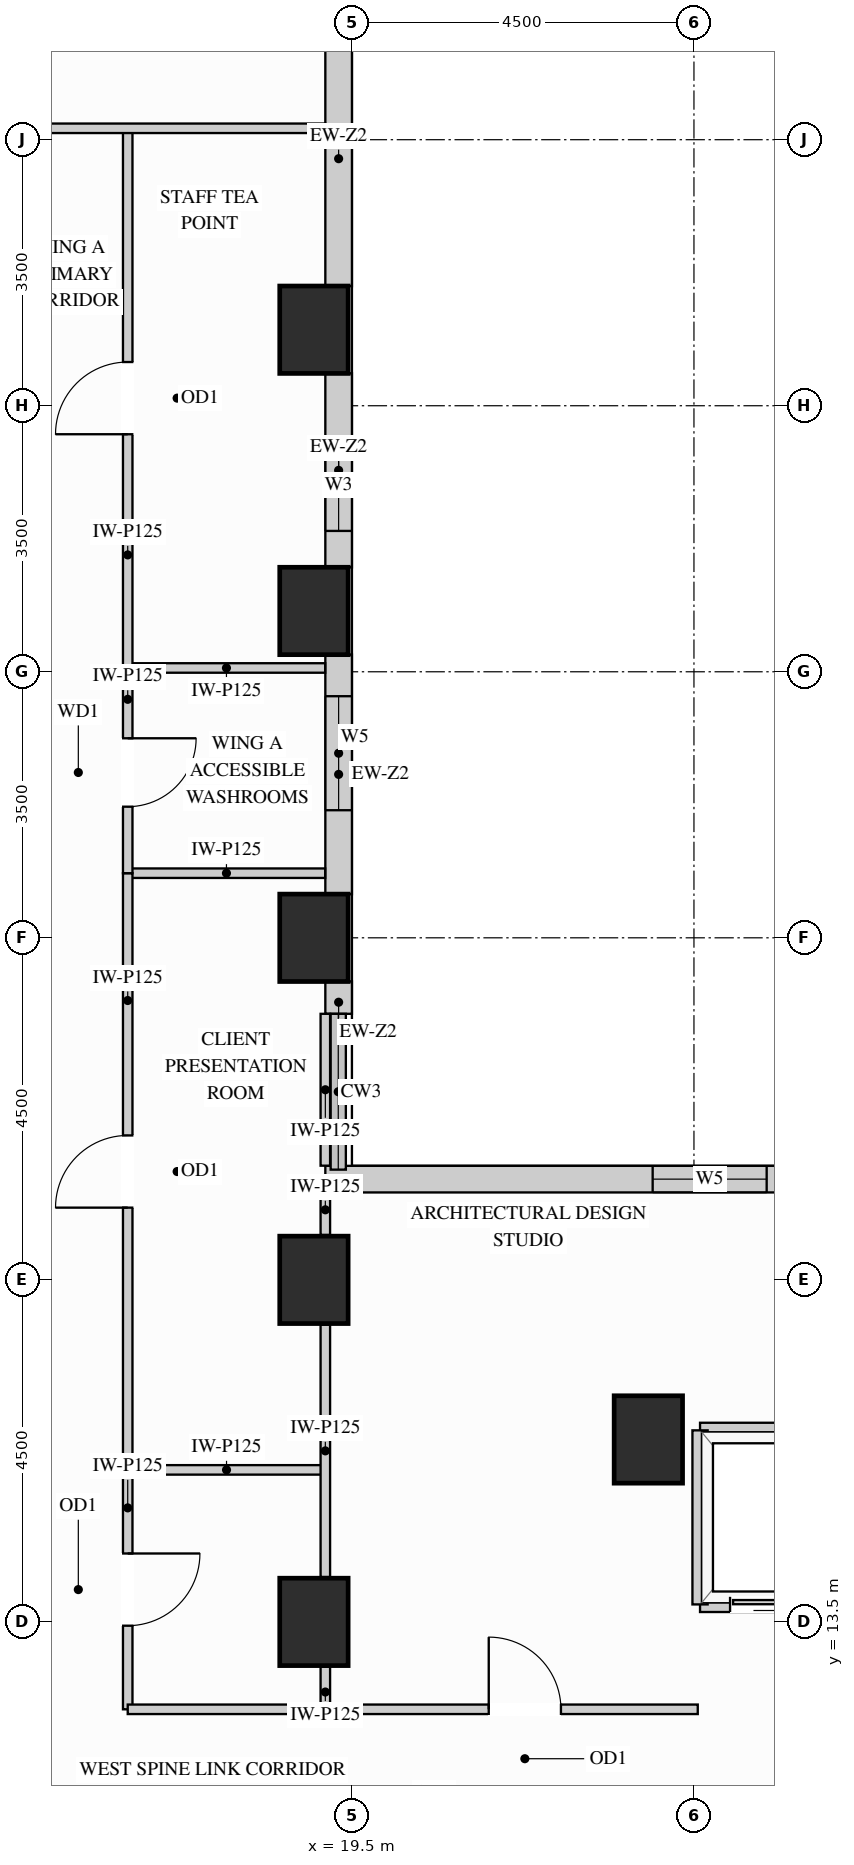
"""IFC4 building model, lengths in metres.
Left out: names, types, materials, properties, quantities, classifications, styles, units other than length and angle.
Written with IfcOpenShell. Run it as: python <this file> out.ifc"""

import sys

from ifc_helpers import new_model, si_unit, direction, frame, frame_2d, origin, origin_2d, place, context, subcontext, project, spatial, rectangle, extrude, source, transform, mapped, element, fill, save


model = new_model("IFC4")
c1 = context("Model", 3, precision=1e-05, world=origin(), true_north=direction((0.0, 1.0)))
c2 = subcontext(c1, "Body", "Model", "MODEL_VIEW")
j1 = project(units=[si_unit("LENGTHUNIT", "METRE"), si_unit("PLANEANGLEUNIT", "RADIAN")], contexts=[c1])
p1 = place(None, origin())
s1 = spatial("IfcSite", under=j1, at=p1, CompositionType="ELEMENT")
p2 = place(p1, origin())
s2 = spatial("IfcBuilding", under=s1, at=p2, CompositionType="ELEMENT")
p3 = place(p2, frame((0.0, 0.0, 109.8)))
s3 = spatial("IfcBuildingStorey", under=s2, at=p3, CompositionType="ELEMENT", Elevation=109.8)
m1 = source(origin(), c2, "Body", "SweptSolid", [
    extrude(rectangle(XDim=0.9, YDim=1.15, at=origin_2d()), origin(), (0.0, 0.0, 1.0), 3.38),
])
for number, where, z_axis, x_axis in (
    (1, (19.0, 13.5, 0.0), (0.0, 0.0, 1.0), (1.0, 0.0, 0.0)),
    (2, (19.0, 18.0, 0.0), (0.0, 0.0, 1.0), (1.0, 0.0, 0.0)),
    (3, (19.0, 22.5, 0.0), (0.0, 0.0, 1.0), (1.0, 0.0, 0.0)),
    (4, (19.0, 26.8, 0.0), (0.0, 0.0, 1.0), (1.0, 0.0, 0.0)),
    (5, (19.0, 30.5, 0.0), (0.0, 0.0, 1.0), (1.0, 0.0, 0.0)),
    (6, (23.4, 15.9, 0.0), (0.0, 0.0, 1.0), (1.0, 0.0, 0.0)),
):
    element("IfcColumn", number, at=place(p3, frame(where, z_axis=z_axis, x_axis=x_axis)), inside=s3, PredefinedType="COLUMN", context=c2, shape_type="MappedRepresentation", body=[
        mapped(m1, transform((0.0, 0.0, 0.0), x_axis=(1.0, 0.0, 0.0), y_axis=(0.0, 1.0, 0.0), z_axis=(0.0, 0.0, 1.0))),
    ])
m2 = source(origin(), c2, "Body", "SweptSolid", [
    extrude(rectangle(XDim=0.427, YDim=0.35, at=frame_2d((0.213, 0.0))), origin(), (0.0, 0.0, 1.0), 2.519),
])
p4 = place(p3, frame((19.325, 21.5, 0.0), z_axis=(0.0, 0.0, 1.0), x_axis=(0.0, 1.0, 0.0)))
e7 = element("IfcWall", 7, at=p4, inside=s3, PredefinedType="SOLIDWALL", context=c2, shape_type="MappedRepresentation", body=[
    mapped(m2, transform((0.0, 0.0, 0.0), x_axis=(1.0, 0.0, 0.0), y_axis=(0.0, 1.0, 0.0), z_axis=(0.0, 0.0, 1.0))),
])
p5 = place(p3, frame((19.325, 23.073, 0.0), z_axis=(0.0, 0.0, 1.0), x_axis=(0.0, 1.0, 0.0)))
e8 = element("IfcWall", 8, at=p5, inside=s3, PredefinedType="SOLIDWALL", context=c2, shape_type="SweptSolid", body=[
    extrude(rectangle(XDim=3.154, YDim=0.35, at=frame_2d((1.577, 0.0))), origin(), (0.0, 0.0, 1.0), 2.519),
])
p6 = place(p5, frame((1.105, 0.0, 0.78)))
e9 = element("IfcOpeningElement", 9, at=p6, cuts=e8, PredefinedType="OPENING", context=c2, shape_type="SweptSolid", body=[
    extrude(rectangle(XDim=1.5, YDim=1.559, at=frame_2d((0.75, 0.78))), frame((0.0, 0.185, 0.0), z_axis=(0.0, -1.0, 0.0), x_axis=(1.0, 0.0, 0.0)), (0.0, 0.0, 1.0), 0.37),
])
p7 = place(p3, frame((19.325, 27.373, 0.0), z_axis=(0.0, 0.0, 1.0), x_axis=(0.0, 1.0, 0.0)))
e10 = element("IfcWall", 10, at=p7, inside=s3, PredefinedType="SOLIDWALL", context=c2, shape_type="SweptSolid", body=[
    extrude(rectangle(XDim=2.554, YDim=0.35, at=frame_2d((1.277, 0.0))), origin(), (0.0, 0.0, 1.0), 2.519),
])
p8 = place(p7, frame((0.48, 0.0, 0.78)))
e11 = element("IfcOpeningElement", 11, at=p8, cuts=e10, PredefinedType="OPENING", context=c2, shape_type="SweptSolid", body=[
    extrude(rectangle(XDim=1.2, YDim=1.559, at=frame_2d((0.6, 0.78))), frame((0.0, 0.185, 0.0), z_axis=(0.0, -1.0, 0.0), x_axis=(1.0, 0.0, 0.0)), (0.0, 0.0, 1.0), 0.37),
])
m3 = source(origin(), c2, "Body", "SweptSolid", [
    extrude(rectangle(XDim=3.354, YDim=0.35, at=frame_2d((1.677, 0.0))), origin(), (0.0, 0.0, 1.0), 2.519),
])
p9 = place(p3, frame((19.325, 31.073, 0.0), z_axis=(0.0, 0.0, 1.0), x_axis=(0.0, 1.0, 0.0)))
e12 = element("IfcWall", 12, at=p9, inside=s3, PredefinedType="SOLIDWALL", context=c2, shape_type="MappedRepresentation", body=[
    mapped(m3, transform((0.0, 0.0, 0.0), x_axis=(1.0, 0.0, 0.0), y_axis=(0.0, 1.0, 0.0), z_axis=(0.0, 0.0, 1.0))),
])
p10 = place(p3, frame((34.75, 19.325, 0.0), z_axis=(0.0, 0.0, 1.0), x_axis=(-1.0, 0.0, 0.0)))
e13 = element("IfcWall", 13, at=p10, inside=s3, PredefinedType="SOLIDWALL", context=c2, shape_type="SweptSolid", body=[
    extrude(rectangle(XDim=15.6, YDim=0.35, at=frame_2d((7.8, 0.0))), origin(), (0.0, 0.0, 1.0), 3.365),
])
p11 = place(p10, frame((4.307, 0.0, 0.78)))
e14 = element("IfcOpeningElement", 14, at=p11, cuts=e13, PredefinedType="OPENING", context=c2, shape_type="SweptSolid", body=[
    extrude(rectangle(XDim=1.5, YDim=2.0, at=frame_2d((0.75, 1.0))), frame((0.0, 0.185, 0.0), z_axis=(0.0, -1.0, 0.0), x_axis=(1.0, 0.0, 0.0)), (0.0, 0.0, 1.0), 0.37),
])
p12 = place(p10, frame((9.793, 0.0, 0.78)))
e15 = element("IfcOpeningElement", 15, at=p12, cuts=e13, PredefinedType="OPENING", context=c2, shape_type="SweptSolid", body=[
    extrude(rectangle(XDim=1.5, YDim=2.0, at=frame_2d((0.75, 1.0))), frame((0.0, 0.185, 0.0), z_axis=(0.0, -1.0, 0.0), x_axis=(1.0, 0.0, 0.0)), (0.0, 0.0, 1.0), 0.37),
])
m4 = source(origin(), c2, "Body", "SweptSolid", [
    extrude(rectangle(XDim=2.6, YDim=0.125, at=frame_2d((1.3, 0.0))), origin(), (0.0, 0.0, 1.0), 3.365),
])
p13 = place(p3, frame((16.55, 15.5, 0.0), z_axis=(0.0, 0.0, 1.0), x_axis=(1.0, 0.0, 0.0)))
e16 = element("IfcWall", 16, at=p13, inside=s3, PredefinedType="PARTITIONING", context=c2, shape_type="MappedRepresentation", body=[
    mapped(m4, transform((0.0, 0.0, 0.0), x_axis=(1.0, 0.0, 0.0), y_axis=(0.0, 1.0, 0.0), z_axis=(0.0, 0.0, 1.0))),
])
m5 = source(origin(), c2, "Body", "SweptSolid", [
    extrude(rectangle(XDim=2.598, YDim=0.125, at=frame_2d((1.299, 0.0))), origin(), (0.0, 0.0, 1.0), 3.365),
])
for number, where, z_axis, x_axis in (
    (17, (16.55, 23.35, 0.0), (0.0, 0.0, 1.0), (1.0, 0.0, 0.0)),
    (18, (16.55, 26.05, 0.0), (0.0, 0.0, 1.0), (1.0, 0.0, 0.0)),
):
    element("IfcWall", number, at=place(p3, frame(where, z_axis=z_axis, x_axis=x_axis)), inside=s3, PredefinedType="PARTITIONING", context=c2, shape_type="MappedRepresentation", body=[
        mapped(m5, transform((0.0, 0.0, 0.0), x_axis=(1.0, 0.0, 0.0), y_axis=(0.0, 1.0, 0.0), z_axis=(0.0, 0.0, 1.0))),
    ])
m6 = source(origin(), c2, "Body", "SweptSolid", [
    extrude(rectangle(XDim=0.56, YDim=0.125, at=frame_2d((0.28, 0.0))), origin(), (0.0, 0.0, 1.0), 2.677),
])
p14 = place(p3, frame((19.15, 12.35, 0.0), z_axis=(0.0, 0.0, 1.0), x_axis=(0.0, 1.0, 0.0)))
e19 = element("IfcWall", 19, at=p14, inside=s3, PredefinedType="PARTITIONING", context=c2, shape_type="MappedRepresentation", body=[
    mapped(m6, transform((0.0, 0.0, 0.0), x_axis=(1.0, 0.0, 0.0), y_axis=(0.0, 1.0, 0.0), z_axis=(0.0, 0.0, 1.0))),
])
m7 = source(origin(), c2, "Body", "SweptSolid", [
    extrude(rectangle(XDim=3.32, YDim=0.125, at=frame_2d((1.66, 0.0))), origin(), (0.0, 0.0, 1.0), 2.677),
])
p15 = place(p3, frame((19.15, 14.09, 0.0), z_axis=(0.0, 0.0, 1.0), x_axis=(0.0, 1.0, 0.0)))
e20 = element("IfcWall", 20, at=p15, inside=s3, PredefinedType="PARTITIONING", context=c2, shape_type="MappedRepresentation", body=[
    mapped(m7, transform((0.0, 0.0, 0.0), x_axis=(1.0, 0.0, 0.0), y_axis=(0.0, 1.0, 0.0), z_axis=(0.0, 0.0, 1.0))),
])
m8 = source(origin(), c2, "Body", "SweptSolid", [
    extrude(rectangle(XDim=0.558, YDim=0.125, at=frame_2d((0.279, 0.0))), origin(), (0.0, 0.0, 1.0), 2.519),
])
p16 = place(p3, frame((19.15, 18.59, 0.0), z_axis=(0.0, 0.0, 1.0), x_axis=(0.0, 1.0, 0.0)))
e21 = element("IfcWall", 21, at=p16, inside=s3, PredefinedType="PARTITIONING", context=c2, shape_type="MappedRepresentation", body=[
    mapped(m8, transform((0.0, 0.0, 0.0), x_axis=(1.0, 0.0, 0.0), y_axis=(0.0, 1.0, 0.0), z_axis=(0.0, 0.0, 1.0))),
])
m9 = source(origin(), c2, "Body", "SweptSolid", [
    extrude(rectangle(XDim=1.998, YDim=0.125, at=frame_2d((0.999, 0.0))), origin(), (0.0, 0.0, 1.0), 2.519),
])
p17 = place(p3, frame((19.15, 19.502, 0.0), z_axis=(0.0, 0.0, 1.0), x_axis=(0.0, 1.0, 0.0)))
e22 = element("IfcWall", 22, at=p17, inside=s3, PredefinedType="PARTITIONING", context=c2, shape_type="MappedRepresentation", body=[
    mapped(m9, transform((0.0, 0.0, 0.0), x_axis=(1.0, 0.0, 0.0), y_axis=(0.0, 1.0, 0.0), z_axis=(0.0, 0.0, 1.0))),
])
p18 = place(p3, frame((16.55, 12.35, 0.0), z_axis=(0.0, 0.0, 1.0), x_axis=(0.0, 1.0, 0.0)))
e23 = element("IfcWall", 23, at=p18, inside=s3, PredefinedType="PARTITIONING", context=c2, shape_type="SweptSolid", body=[
    extrude(rectangle(XDim=3.15, YDim=0.125, at=frame_2d((1.575, 0.0))), origin(), (0.0, 0.0, 1.0), 3.365),
])
p19 = place(p18, frame((1.1, 0.0, 0.0)))
e24 = element("IfcOpeningElement", 24, at=p19, cuts=e23, PredefinedType="OPENING", context=c2, shape_type="SweptSolid", body=[
    extrude(rectangle(XDim=0.95, YDim=2.15, at=frame_2d((0.475, 1.075))), frame((0.0, 0.073, 0.0), z_axis=(0.0, -1.0, 0.0), x_axis=(1.0, 0.0, 0.0)), (0.0, 0.0, 1.0), 0.145),
])
p20 = place(p3, frame((16.55, 15.5, 0.0), z_axis=(0.0, 0.0, 1.0), x_axis=(0.0, 1.0, 0.0)))
e25 = element("IfcWall", 25, at=p20, inside=s3, PredefinedType="PARTITIONING", context=c2, shape_type="SweptSolid", body=[
    extrude(rectangle(XDim=7.85, YDim=0.125, at=frame_2d((3.925, 0.0))), origin(), (0.0, 0.0, 1.0), 3.365),
])
p21 = place(p20, frame((3.45, 0.0, 0.0)))
e26 = element("IfcOpeningElement", 26, at=p21, cuts=e25, PredefinedType="OPENING", context=c2, shape_type="SweptSolid", body=[
    extrude(rectangle(XDim=0.95, YDim=2.15, at=frame_2d((0.475, 1.075))), frame((0.0, 0.073, 0.0), z_axis=(0.0, -1.0, 0.0), x_axis=(1.0, 0.0, 0.0)), (0.0, 0.0, 1.0), 0.145),
])
p22 = place(p3, frame((16.55, 26.05, 0.0), z_axis=(0.0, 0.0, 1.0), x_axis=(0.0, 1.0, 0.0)))
e27 = element("IfcWall", 27, at=p22, inside=s3, PredefinedType="PARTITIONING", context=c2, shape_type="SweptSolid", body=[
    extrude(rectangle(XDim=7.1, YDim=0.125, at=frame_2d((3.55, 0.0))), origin(), (0.0, 0.0, 1.0), 3.365),
])
p23 = place(p22, frame((3.075, 0.0, 0.0)))
e28 = element("IfcOpeningElement", 28, at=p23, cuts=e27, PredefinedType="OPENING", context=c2, shape_type="SweptSolid", body=[
    extrude(rectangle(XDim=0.95, YDim=2.15, at=frame_2d((0.475, 1.075))), frame((0.0, 0.073, 0.0), z_axis=(0.0, -1.0, 0.0), x_axis=(1.0, 0.0, 0.0)), (0.0, 0.0, 1.0), 0.145),
])
p24 = place(p3, frame((16.55, 23.35, 0.0), z_axis=(0.0, 0.0, 1.0), x_axis=(0.0, 1.0, 0.0)))
e29 = element("IfcWall", 29, at=p24, inside=s3, PredefinedType="PARTITIONING", context=c2, shape_type="SweptSolid", body=[
    extrude(rectangle(XDim=2.7, YDim=0.125, at=frame_2d((1.35, 0.0))), origin(), (0.0, 0.0, 1.0), 3.365),
])
p25 = place(p24, frame((0.875, 0.0, 0.0)))
e30 = element("IfcOpeningElement", 30, at=p25, cuts=e29, PredefinedType="OPENING", context=c2, shape_type="SweptSolid", body=[
    extrude(rectangle(XDim=0.9, YDim=2.15, at=frame_2d((0.45, 1.075))), frame((0.0, 0.073, 0.0), z_axis=(0.0, -1.0, 0.0), x_axis=(1.0, 0.0, 0.0)), (0.0, 0.0, 1.0), 0.145),
])
m10 = source(origin(), c2, "Body", "SweptSolid", [
    extrude(rectangle(XDim=12.598, YDim=0.125, at=frame_2d((6.299, 0.0))), origin(), (0.0, 0.0, 1.0), 3.365),
])
p26 = place(p3, frame((6.55, 33.15, 0.0), z_axis=(0.0, 0.0, 1.0), x_axis=(1.0, 0.0, 0.0)))
e31 = element("IfcWall", 31, at=p26, inside=s3, PredefinedType="PARTITIONING", context=c2, shape_type="MappedRepresentation", body=[
    mapped(m10, transform((0.0, 0.0, 0.0), x_axis=(1.0, 0.0, 0.0), y_axis=(0.0, 1.0, 0.0), z_axis=(0.0, 0.0, 1.0))),
])
m11 = source(origin(), c2, "Body", "SweptSolid", [
    extrude(rectangle(XDim=2.95, YDim=0.125, at=frame_2d((1.475, 0.0))), origin(), (0.0, 0.0, 1.0), 3.365),
])
p27 = place(p3, frame((16.55, 12.35, 0.0), z_axis=(0.0, 0.0, 1.0), x_axis=(1.0, 0.0, 0.0)))
e32 = element("IfcWall", 32, at=p27, inside=s3, PredefinedType="PARTITIONING", context=c2, shape_type="MappedRepresentation", body=[
    mapped(m11, transform((0.0, 0.0, 0.0), x_axis=(1.0, 0.0, 0.0), y_axis=(0.0, 1.0, 0.0), z_axis=(0.0, 0.0, 1.0))),
])
p28 = place(p3, frame((19.5, 12.35, 0.0), z_axis=(0.0, 0.0, 1.0), x_axis=(1.0, 0.0, 0.0)))
e33 = element("IfcWall", 33, at=p28, inside=s3, PredefinedType="PARTITIONING", context=c2, shape_type="SweptSolid", body=[
    extrude(rectangle(XDim=4.55, YDim=0.125, at=frame_2d((2.275, 0.0))), origin(), (0.0, 0.0, 1.0), 3.365),
])
p29 = place(p28, frame((1.8, 0.0, 0.0)))
e34 = element("IfcOpeningElement", 34, at=p29, cuts=e33, PredefinedType="OPENING", context=c2, shape_type="SweptSolid", body=[
    extrude(rectangle(XDim=0.95, YDim=2.15, at=frame_2d((0.475, 1.075))), frame((0.0, 0.073, 0.0), z_axis=(0.0, -1.0, 0.0), x_axis=(1.0, 0.0, 0.0)), (0.0, 0.0, 1.0), 0.145),
])
m12 = source(origin(), c2, "Body", "SweptSolid", [
    extrude(rectangle(XDim=1.89, YDim=0.2, at=frame_2d((0.945, 0.0))), origin(), (0.0, 0.0, 1.0), 2.677),
])
p30 = place(p3, frame((24.08, 16.02, 0.0), z_axis=(0.0, 0.0, 1.0), x_axis=(1.0, 0.0, 0.0)))
e35 = element("IfcWall", 35, at=p30, inside=s3, PredefinedType="PARTITIONING", context=c2, shape_type="MappedRepresentation", body=[
    mapped(m12, transform((0.0, 0.0, 0.0), x_axis=(1.0, 0.0, 0.0), y_axis=(0.0, 1.0, 0.0), z_axis=(0.0, 0.0, 1.0))),
])
p31 = place(p3, frame((24.08, 13.73, 0.0), z_axis=(0.0, 0.0, 1.0), x_axis=(1.0, 0.0, 0.0)))
e36 = element("IfcWall", 36, at=p31, inside=s3, PredefinedType="PARTITIONING", context=c2, shape_type="SweptSolid", body=[
    extrude(rectangle(XDim=1.89, YDim=0.2, at=frame_2d((0.945, 0.0))), origin(), (0.0, 0.0, 1.0), 2.446),
])
p32 = place(p31, frame((0.395, 0.0, 0.0)))
e37 = element("IfcOpeningElement", 37, at=p32, cuts=e36, PredefinedType="OPENING", context=c2, shape_type="SweptSolid", body=[
    extrude(rectangle(XDim=1.1, YDim=2.2, at=frame_2d((0.55, 1.1))), frame((0.0, 0.11, 0.0), z_axis=(0.0, -1.0, 0.0), x_axis=(1.0, 0.0, 0.0)), (0.0, 0.0, 1.0), 0.22),
])
m13 = source(origin(), c2, "Body", "SweptSolid", [
    extrude(rectangle(XDim=2.29, YDim=0.2, at=frame_2d((1.145, 0.0))), origin(), (0.0, 0.0, 1.0), 3.365),
])
p33 = place(p3, frame((24.08, 13.73, 0.0), z_axis=(0.0, 0.0, 1.0), x_axis=(0.0, 1.0, 0.0)))
e38 = element("IfcWall", 38, at=p33, inside=s3, PredefinedType="PARTITIONING", context=c2, shape_type="MappedRepresentation", body=[
    mapped(m13, transform((0.0, 0.0, 0.0), x_axis=(1.0, 0.0, 0.0), y_axis=(0.0, 1.0, 0.0), z_axis=(0.0, 0.0, 1.0))),
])
m14 = source(origin(), c2, "Body", "SweptSolid", [
    extrude(rectangle(XDim=1.1, YDim=2.2, at=frame_2d((0.55, 1.1))), frame((0.0, 0.025, 0.0), z_axis=(0.0, -1.0, 0.0), x_axis=(1.0, 0.0, 0.0)), (0.0, 0.0, 1.0), 0.05),
])
p34 = place(p32, origin())
e39 = element("IfcDoor", 39, at=p34, inside=s3, OperationType="SLIDING_TO_LEFT", PredefinedType="DOOR", context=c2, shape_type="MappedRepresentation", body=[
    mapped(m14, transform((0.0, 0.0, 0.0), x_axis=(1.0, 0.0, 0.0), y_axis=(0.0, 1.0, 0.0), z_axis=(0.0, 0.0, 1.0))),
])
fill(e37, e39)
m15 = source(origin(), c2, "Body", "SweptSolid", [
    extrude(rectangle(XDim=0.95, YDim=2.15, at=frame_2d((0.475, 1.075))), frame((0.0, 0.025, 0.0), z_axis=(0.0, -1.0, 0.0), x_axis=(1.0, 0.0, 0.0)), (0.0, 0.0, 1.0), 0.05),
])
p35 = place(p19, origin())
e40 = element("IfcDoor", 40, at=p35, inside=s3, OperationType="SINGLE_SWING_RIGHT", PredefinedType="DOOR", context=c2, shape_type="MappedRepresentation", body=[
    mapped(m15, transform((0.0, 0.0, 0.0), x_axis=(1.0, 0.0, 0.0), y_axis=(0.0, 1.0, 0.0), z_axis=(0.0, 0.0, 1.0))),
])
fill(e24, e40)
p36 = place(p21, origin())
e41 = element("IfcDoor", 41, at=p36, inside=s3, OperationType="SINGLE_SWING_LEFT", PredefinedType="DOOR", context=c2, shape_type="MappedRepresentation", body=[
    mapped(m15, transform((0.0, 0.0, 0.0), x_axis=(1.0, 0.0, 0.0), y_axis=(0.0, 1.0, 0.0), z_axis=(0.0, 0.0, 1.0))),
])
fill(e26, e41)
p37 = place(p23, origin())
e42 = element("IfcDoor", 42, at=p37, inside=s3, OperationType="SINGLE_SWING_LEFT", PredefinedType="DOOR", context=c2, shape_type="MappedRepresentation", body=[
    mapped(m15, transform((0.0, 0.0, 0.0), x_axis=(1.0, 0.0, 0.0), y_axis=(0.0, 1.0, 0.0), z_axis=(0.0, 0.0, 1.0))),
])
fill(e28, e42)
p38 = place(p29, origin())
e43 = element("IfcDoor", 43, at=p38, inside=s3, OperationType="SINGLE_SWING_LEFT", PredefinedType="DOOR", context=c2, shape_type="MappedRepresentation", body=[
    mapped(m15, transform((0.0, 0.0, 0.0), x_axis=(1.0, 0.0, 0.0), y_axis=(0.0, 1.0, 0.0), z_axis=(0.0, 0.0, 1.0))),
])
fill(e34, e43)
m16 = source(origin(), c2, "Body", "SweptSolid", [
    extrude(rectangle(XDim=0.9, YDim=2.15, at=frame_2d((0.45, 1.075))), frame((0.0, 0.025, 0.0), z_axis=(0.0, -1.0, 0.0), x_axis=(1.0, 0.0, 0.0)), (0.0, 0.0, 1.0), 0.05),
])
p39 = place(p25, origin())
e44 = element("IfcDoor", 44, at=p39, inside=s3, OperationType="SINGLE_SWING_RIGHT", PredefinedType="DOOR", context=c2, shape_type="MappedRepresentation", body=[
    mapped(m16, transform((0.0, 0.0, 0.0), x_axis=(1.0, 0.0, 0.0), y_axis=(0.0, 1.0, 0.0), z_axis=(0.0, 0.0, 1.0))),
])
fill(e30, e44)
m17 = source(origin(), c2, "Body", "SweptSolid", [
    extrude(rectangle(XDim=1.2, YDim=1.559, at=frame_2d((0.6, 0.78))), frame((0.0, 0.03, 0.0), z_axis=(0.0, -1.0, 0.0), x_axis=(1.0, 0.0, 0.0)), (0.0, 0.0, 1.0), 0.06),
])
p40 = place(p8, origin())
e45 = element("IfcWindow", 45, at=p40, inside=s3, PartitioningType="SINGLE_PANEL", PredefinedType="WINDOW", context=c2, shape_type="MappedRepresentation", body=[
    mapped(m17, transform((0.0, 0.0, 0.0), x_axis=(1.0, 0.0, 0.0), y_axis=(0.0, 1.0, 0.0), z_axis=(0.0, 0.0, 1.0))),
])
fill(e11, e45)
m18 = source(origin(), c2, "Body", "SweptSolid", [
    extrude(rectangle(XDim=1.5, YDim=1.559, at=frame_2d((0.75, 0.78))), frame((0.0, 0.03, 0.0), z_axis=(0.0, -1.0, 0.0), x_axis=(1.0, 0.0, 0.0)), (0.0, 0.0, 1.0), 0.06),
])
p41 = place(p6, origin())
e46 = element("IfcWindow", 46, at=p41, inside=s3, PartitioningType="SINGLE_PANEL", PredefinedType="WINDOW", context=c2, shape_type="MappedRepresentation", body=[
    mapped(m18, transform((0.0, 0.0, 0.0), x_axis=(1.0, 0.0, 0.0), y_axis=(0.0, 1.0, 0.0), z_axis=(0.0, 0.0, 1.0))),
])
fill(e9, e46)
m19 = source(origin(), c2, "Body", "SweptSolid", [
    extrude(rectangle(XDim=1.5, YDim=2.0, at=frame_2d((0.75, 1.0))), frame((0.0, 0.03, 0.0), z_axis=(0.0, -1.0, 0.0), x_axis=(1.0, 0.0, 0.0)), (0.0, 0.0, 1.0), 0.06),
])
p42 = place(p12, origin())
e47 = element("IfcWindow", 47, at=p42, inside=s3, PartitioningType="SINGLE_PANEL", PredefinedType="WINDOW", context=c2, shape_type="MappedRepresentation", body=[
    mapped(m19, transform((0.0, 0.0, 0.0), x_axis=(1.0, 0.0, 0.0), y_axis=(0.0, 1.0, 0.0), z_axis=(0.0, 0.0, 1.0))),
])
fill(e15, e47)
save(model, sys.argv[1])
